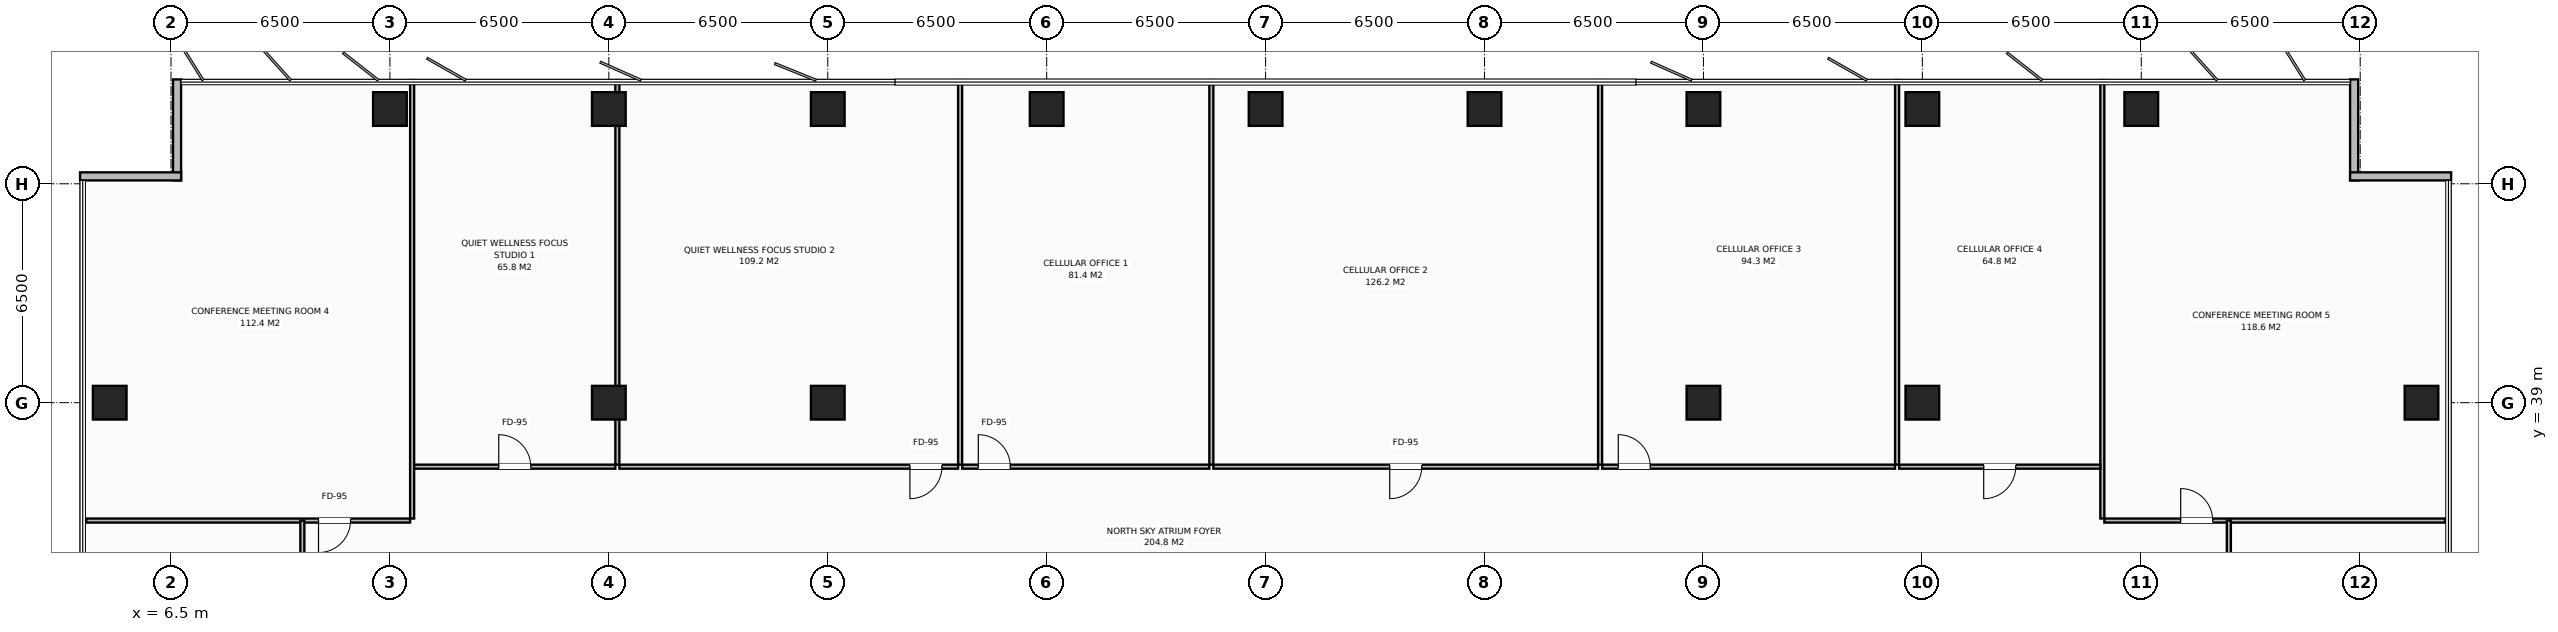
"""IFC4 building model, lengths in metres.
Left out: names, types, materials, properties, quantities, classifications, styles, units other than length and angle.
Written with IfcOpenShell. Run it as: python <this file> out.ifc"""

import sys

from ifc_helpers import new_model, si_unit, direction, frame, frame_2d, origin, origin_2d, place, context, subcontext, project, spatial, rectangle, extrude, element, fill, save


model = new_model("IFC4")
c1 = context("Model", 3, precision=1e-05, world=origin(), true_north=direction((0.0, 1.0)))
c2 = subcontext(c1, "Body", "Model", "MODEL_VIEW")
j1 = project(units=[si_unit("LENGTHUNIT", "METRE"), si_unit("PLANEANGLEUNIT", "RADIAN")], contexts=[c1])
p1 = place(None, origin())
s1 = spatial("IfcSite", under=j1, at=p1, CompositionType="ELEMENT")
p2 = place(p1, origin())
s2 = spatial("IfcBuilding", under=s1, at=p2, CompositionType="ELEMENT")
p3 = place(p2, frame((0.0, 0.0, 174.6)))
s3 = spatial("IfcBuildingStorey", under=s2, at=p3, CompositionType="ELEMENT", Elevation=174.6)
for number, where, z_axis, x_axis in (
    (1, (19.5, 39.0, 0.0), (0.0, 0.0, 1.0), (1.0, 0.0, 0.0)),
    (2, (58.5, 39.0, 0.0), (0.0, 0.0, 1.0), (1.0, 0.0, 0.0)),
    (3, (26.0, 39.0, 0.0), (0.0, 0.0, 1.0), (1.0, 0.0, 0.0)),
    (4, (52.0, 39.0, 0.0), (0.0, 0.0, 1.0), (1.0, 0.0, 0.0)),
    (5, (13.0, 47.72, 0.0), (0.0, 0.0, 1.0), (1.0, 0.0, 0.0)),
    (6, (19.5, 47.72, 0.0), (0.0, 0.0, 1.0), (1.0, 0.0, 0.0)),
    (7, (26.0, 47.72, 0.0), (0.0, 0.0, 1.0), (1.0, 0.0, 0.0)),
    (8, (32.5, 47.72, 0.0), (0.0, 0.0, 1.0), (1.0, 0.0, 0.0)),
    (9, (39.0, 47.72, 0.0), (0.0, 0.0, 1.0), (1.0, 0.0, 0.0)),
    (10, (45.5, 47.72, 0.0), (0.0, 0.0, 1.0), (1.0, 0.0, 0.0)),
    (11, (52.0, 47.72, 0.0), (0.0, 0.0, 1.0), (1.0, 0.0, 0.0)),
    (12, (58.5, 47.72, 0.0), (0.0, 0.0, 1.0), (1.0, 0.0, 0.0)),
    (13, (65.0, 47.72, 0.0), (0.0, 0.0, 1.0), (1.0, 0.0, 0.0)),
    (14, (4.68, 39.0, 0.0), (0.0, 0.0, 1.0), (1.0, 0.0, 0.0)),
    (15, (73.32, 39.0, 0.0), (0.0, 0.0, 1.0), (1.0, 0.0, 0.0)),
):
    element("IfcColumn", number, at=place(p3, frame(where, z_axis=z_axis, x_axis=x_axis)), inside=s3, PredefinedType="COLUMN", context=c2, shape_type="SweptSolid", body=[
        extrude(rectangle(XDim=1.0, YDim=1.0, at=origin_2d()), origin(), (0.0, 0.0, 1.0), 3.8),
    ])
for number, where, z_axis, x_axis in (
    (16, (6.68, 45.6, 0.0), (0.0, 0.0, 1.0), (0.0, 1.0, 0.0)),
    (17, (3.8, 45.72, 0.0), (0.0, 0.0, 1.0), (1.0, 0.0, 0.0)),
    (18, (71.32, 48.6, 0.0), (0.0, 0.0, 1.0), (0.0, -1.0, 0.0)),
    (19, (71.2, 45.72, 0.0), (0.0, 0.0, 1.0), (1.0, 0.0, 0.0)),
):
    element("IfcWall", number, at=place(p3, frame(where, z_axis=z_axis, x_axis=x_axis)), inside=s3, PredefinedType="STANDARD", context=c2, shape_type="SweptSolid", body=[
        extrude(rectangle(XDim=3.0, YDim=0.24, at=frame_2d((1.5, 0.0))), origin(), (0.0, 0.0, 1.0), 3.572),
    ])
p4 = place(p3, frame((13.659, 35.56, 0.0), z_axis=(0.0, 0.0, 1.0), x_axis=(0.0, 1.0, 0.0)))
e20 = element("IfcWall", 20, at=p4, inside=s3, PredefinedType="PARTITIONING", context=c2, shape_type="SweptSolid", body=[
    extrude(rectangle(XDim=13.02, YDim=0.12, at=frame_2d((6.51, 0.0))), origin(), (0.0, 0.0, 1.0), 3.572),
])
p5 = place(p3, frame((3.98, 35.5, 0.0), z_axis=(0.0, 0.0, 1.0), x_axis=(1.0, 0.0, 0.0)))
e21 = element("IfcWall", 21, at=p5, inside=s3, PredefinedType="PARTITIONING", context=c2, shape_type="SweptSolid", body=[
    extrude(rectangle(XDim=9.62, YDim=0.12, at=frame_2d((4.81, 0.0))), origin(), (0.0, 0.0, 1.0), 3.572),
])
p6 = place(p5, frame((6.9, 0.0, 0.0)))
e22 = element("IfcOpeningElement", 22, at=p6, cuts=e21, PredefinedType="OPENING", context=c2, shape_type="SweptSolid", body=[
    extrude(rectangle(XDim=0.95, YDim=2.15, at=frame_2d((0.475, 1.075))), frame((0.0, 0.07, 0.0), z_axis=(0.0, -1.0, 0.0), x_axis=(1.0, 0.0, 0.0)), (0.0, 0.0, 1.0), 0.14),
])
p7 = place(p3, frame((19.753, 37.16, 0.0), z_axis=(0.0, 0.0, 1.0), x_axis=(0.0, 1.0, 0.0)))
e23 = element("IfcWall", 23, at=p7, inside=s3, PredefinedType="PARTITIONING", context=c2, shape_type="SweptSolid", body=[
    extrude(rectangle(XDim=11.42, YDim=0.12, at=frame_2d((5.71, 0.0))), origin(), (0.0, 0.0, 1.0), 3.572),
])
p8 = place(p3, frame((13.719, 37.1, 0.0), z_axis=(0.0, 0.0, 1.0), x_axis=(1.0, 0.0, 0.0)))
e24 = element("IfcWall", 24, at=p8, inside=s3, PredefinedType="PARTITIONING", context=c2, shape_type="SweptSolid", body=[
    extrude(rectangle(XDim=5.974, YDim=0.12, at=frame_2d((2.987, 0.0))), origin(), (0.0, 0.0, 1.0), 3.572),
])
p9 = place(p8, frame((2.512, 0.0, 0.0)))
e25 = element("IfcOpeningElement", 25, at=p9, cuts=e24, PredefinedType="OPENING", context=c2, shape_type="SweptSolid", body=[
    extrude(rectangle(XDim=0.95, YDim=2.15, at=frame_2d((0.475, 1.075))), frame((0.0, 0.07, 0.0), z_axis=(0.0, -1.0, 0.0), x_axis=(1.0, 0.0, 0.0)), (0.0, 0.0, 1.0), 0.14),
])
p10 = place(p3, frame((29.93, 37.16, 0.0), z_axis=(0.0, 0.0, 1.0), x_axis=(0.0, 1.0, 0.0)))
e26 = element("IfcWall", 26, at=p10, inside=s3, PredefinedType="PARTITIONING", context=c2, shape_type="SweptSolid", body=[
    extrude(rectangle(XDim=11.42, YDim=0.12, at=frame_2d((5.71, 0.0))), origin(), (0.0, 0.0, 1.0), 3.572),
])
p11 = place(p3, frame((19.813, 37.1, 0.0), z_axis=(0.0, 0.0, 1.0), x_axis=(1.0, 0.0, 0.0)))
e27 = element("IfcWall", 27, at=p11, inside=s3, PredefinedType="PARTITIONING", context=c2, shape_type="SweptSolid", body=[
    extrude(rectangle(XDim=10.057, YDim=0.12, at=frame_2d((5.028, 0.0))), origin(), (0.0, 0.0, 1.0), 3.572),
])
p12 = place(p11, frame((8.627, 0.0, 0.0)))
e28 = element("IfcOpeningElement", 28, at=p12, cuts=e27, PredefinedType="OPENING", context=c2, shape_type="SweptSolid", body=[
    extrude(rectangle(XDim=0.95, YDim=2.15, at=frame_2d((0.475, 1.075))), frame((0.0, 0.07, 0.0), z_axis=(0.0, -1.0, 0.0), x_axis=(1.0, 0.0, 0.0)), (0.0, 0.0, 1.0), 0.14),
])
p13 = place(p3, frame((37.389, 37.16, 0.0), z_axis=(0.0, 0.0, 1.0), x_axis=(0.0, 1.0, 0.0)))
e29 = element("IfcWall", 29, at=p13, inside=s3, PredefinedType="PARTITIONING", context=c2, shape_type="SweptSolid", body=[
    extrude(rectangle(XDim=11.42, YDim=0.12, at=frame_2d((5.71, 0.0))), origin(), (0.0, 0.0, 1.0), 3.572),
])
p14 = place(p3, frame((29.99, 37.1, 0.0), z_axis=(0.0, 0.0, 1.0), x_axis=(1.0, 0.0, 0.0)))
e30 = element("IfcWall", 30, at=p14, inside=s3, PredefinedType="PARTITIONING", context=c2, shape_type="SweptSolid", body=[
    extrude(rectangle(XDim=7.339, YDim=0.12, at=frame_2d((3.67, 0.0))), origin(), (0.0, 0.0, 1.0), 3.572),
])
p15 = place(p14, frame((0.48, 0.0, 0.0)))
e31 = element("IfcOpeningElement", 31, at=p15, cuts=e30, PredefinedType="OPENING", context=c2, shape_type="SweptSolid", body=[
    extrude(rectangle(XDim=0.95, YDim=2.15, at=frame_2d((0.475, 1.075))), frame((0.0, 0.07, 0.0), z_axis=(0.0, -1.0, 0.0), x_axis=(1.0, 0.0, 0.0)), (0.0, 0.0, 1.0), 0.14),
])
p16 = place(p3, frame((48.932, 37.16, 0.0), z_axis=(0.0, 0.0, 1.0), x_axis=(0.0, 1.0, 0.0)))
e32 = element("IfcWall", 32, at=p16, inside=s3, PredefinedType="PARTITIONING", context=c2, shape_type="SweptSolid", body=[
    extrude(rectangle(XDim=11.42, YDim=0.12, at=frame_2d((5.71, 0.0))), origin(), (0.0, 0.0, 1.0), 3.572),
])
p17 = place(p3, frame((37.449, 37.1, 0.0), z_axis=(0.0, 0.0, 1.0), x_axis=(1.0, 0.0, 0.0)))
e33 = element("IfcWall", 33, at=p17, inside=s3, PredefinedType="PARTITIONING", context=c2, shape_type="SweptSolid", body=[
    extrude(rectangle(XDim=11.422, YDim=0.12, at=frame_2d((5.711, 0.0))), origin(), (0.0, 0.0, 1.0), 3.572),
])
p18 = place(p17, frame((5.236, 0.0, 0.0)))
e34 = element("IfcOpeningElement", 34, at=p18, cuts=e33, PredefinedType="OPENING", context=c2, shape_type="SweptSolid", body=[
    extrude(rectangle(XDim=0.95, YDim=2.15, at=frame_2d((0.475, 1.075))), frame((0.0, 0.07, 0.0), z_axis=(0.0, -1.0, 0.0), x_axis=(1.0, 0.0, 0.0)), (0.0, 0.0, 1.0), 0.14),
])
p19 = place(p3, frame((57.75, 37.16, 0.0), z_axis=(0.0, 0.0, 1.0), x_axis=(0.0, 1.0, 0.0)))
e35 = element("IfcWall", 35, at=p19, inside=s3, PredefinedType="PARTITIONING", context=c2, shape_type="SweptSolid", body=[
    extrude(rectangle(XDim=11.42, YDim=0.12, at=frame_2d((5.71, 0.0))), origin(), (0.0, 0.0, 1.0), 3.572),
])
p20 = place(p3, frame((48.992, 37.1, 0.0), z_axis=(0.0, 0.0, 1.0), x_axis=(1.0, 0.0, 0.0)))
e36 = element("IfcWall", 36, at=p20, inside=s3, PredefinedType="PARTITIONING", context=c2, shape_type="SweptSolid", body=[
    extrude(rectangle(XDim=8.698, YDim=0.12, at=frame_2d((4.349, 0.0))), origin(), (0.0, 0.0, 1.0), 3.572),
])
p21 = place(p20, frame((0.48, 0.0, 0.0)))
e37 = element("IfcOpeningElement", 37, at=p21, cuts=e36, PredefinedType="OPENING", context=c2, shape_type="SweptSolid", body=[
    extrude(rectangle(XDim=0.95, YDim=2.15, at=frame_2d((0.475, 1.075))), frame((0.0, 0.07, 0.0), z_axis=(0.0, -1.0, 0.0), x_axis=(1.0, 0.0, 0.0)), (0.0, 0.0, 1.0), 0.14),
])
p22 = place(p3, frame((63.843, 35.56, 0.0), z_axis=(0.0, 0.0, 1.0), x_axis=(0.0, 1.0, 0.0)))
e38 = element("IfcWall", 38, at=p22, inside=s3, PredefinedType="PARTITIONING", context=c2, shape_type="SweptSolid", body=[
    extrude(rectangle(XDim=13.02, YDim=0.12, at=frame_2d((6.51, 0.0))), origin(), (0.0, 0.0, 1.0), 3.572),
])
p23 = place(p3, frame((57.81, 37.1, 0.0), z_axis=(0.0, 0.0, 1.0), x_axis=(1.0, 0.0, 0.0)))
e39 = element("IfcWall", 39, at=p23, inside=s3, PredefinedType="PARTITIONING", context=c2, shape_type="SweptSolid", body=[
    extrude(rectangle(XDim=5.973, YDim=0.12, at=frame_2d((2.987, 0.0))), origin(), (0.0, 0.0, 1.0), 3.572),
])
p24 = place(p23, frame((2.512, 0.0, 0.0)))
e40 = element("IfcOpeningElement", 40, at=p24, cuts=e39, PredefinedType="OPENING", context=c2, shape_type="SweptSolid", body=[
    extrude(rectangle(XDim=0.95, YDim=2.15, at=frame_2d((0.475, 1.075))), frame((0.0, 0.07, 0.0), z_axis=(0.0, -1.0, 0.0), x_axis=(1.0, 0.0, 0.0)), (0.0, 0.0, 1.0), 0.14),
])
p25 = place(p3, frame((63.903, 35.5, 0.0), z_axis=(0.0, 0.0, 1.0), x_axis=(1.0, 0.0, 0.0)))
e41 = element("IfcWall", 41, at=p25, inside=s3, PredefinedType="PARTITIONING", context=c2, shape_type="SweptSolid", body=[
    extrude(rectangle(XDim=10.117, YDim=0.12, at=frame_2d((5.058, 0.0))), origin(), (0.0, 0.0, 1.0), 3.572),
])
p26 = place(p25, frame((2.267, 0.0, 0.0)))
e42 = element("IfcOpeningElement", 42, at=p26, cuts=e41, PredefinedType="OPENING", context=c2, shape_type="SweptSolid", body=[
    extrude(rectangle(XDim=0.95, YDim=2.15, at=frame_2d((0.475, 1.075))), frame((0.0, 0.07, 0.0), z_axis=(0.0, -1.0, 0.0), x_axis=(1.0, 0.0, 0.0)), (0.0, 0.0, 1.0), 0.14),
])
p27 = place(p3, frame((10.4, 27.05, 0.0), z_axis=(0.0, 0.0, 1.0), x_axis=(0.0, 1.0, 0.0)))
e43 = element("IfcWall", 43, at=p27, inside=s3, PredefinedType="PARTITIONING", context=c2, shape_type="SweptSolid", body=[
    extrude(rectangle(XDim=8.45, YDim=0.12, at=frame_2d((4.225, 0.0))), origin(), (0.0, 0.0, 1.0), 3.572),
])
p28 = place(p27, frame((2.7, 0.0, 0.0)))
e44 = element("IfcOpeningElement", 44, at=p28, cuts=e43, PredefinedType="OPENING", context=c2, shape_type="SweptSolid", body=[
    extrude(rectangle(XDim=0.95, YDim=2.15, at=frame_2d((0.475, 1.075))), frame((0.0, 0.07, 0.0), z_axis=(0.0, -1.0, 0.0), x_axis=(1.0, 0.0, 0.0)), (0.0, 0.0, 1.0), 0.14),
])
p29 = place(p3, frame((67.6, 16.5, 0.0), z_axis=(0.0, 0.0, 1.0), x_axis=(0.0, 1.0, 0.0)))
e45 = element("IfcWall", 45, at=p29, inside=s3, PredefinedType="PARTITIONING", context=c2, shape_type="SweptSolid", body=[
    extrude(rectangle(XDim=19.0, YDim=0.12, at=frame_2d((9.5, 0.0))), origin(), (0.0, 0.0, 1.0), 3.572),
])
p30 = place(p29, frame((9.025, 0.0, 0.0)))
e46 = element("IfcOpeningElement", 46, at=p30, cuts=e45, PredefinedType="OPENING", context=c2, shape_type="SweptSolid", body=[
    extrude(rectangle(XDim=0.95, YDim=2.15, at=frame_2d((0.475, 1.075))), frame((0.0, 0.07, 0.0), z_axis=(0.0, -1.0, 0.0), x_axis=(1.0, 0.0, 0.0)), (0.0, 0.0, 1.0), 0.14),
])
p31 = place(p6, origin())
e47 = element("IfcDoor", 47, at=p31, inside=s3, OperationType="SINGLE_SWING_RIGHT", PredefinedType="DOOR", context=c2, shape_type="SweptSolid", body=[
    extrude(rectangle(XDim=0.95, YDim=2.15, at=frame_2d((0.475, 1.075))), frame((0.0, 0.025, 0.0), z_axis=(0.0, -1.0, 0.0), x_axis=(1.0, 0.0, 0.0)), (0.0, 0.0, 1.0), 0.05),
])
fill(e22, e47)
p32 = place(p9, origin())
e48 = element("IfcDoor", 48, at=p32, inside=s3, OperationType="SINGLE_SWING_LEFT", PredefinedType="DOOR", context=c2, shape_type="SweptSolid", body=[
    extrude(rectangle(XDim=0.95, YDim=2.15, at=frame_2d((0.475, 1.075))), frame((0.0, 0.025, 0.0), z_axis=(0.0, -1.0, 0.0), x_axis=(1.0, 0.0, 0.0)), (0.0, 0.0, 1.0), 0.05),
])
fill(e25, e48)
p33 = place(p12, origin())
e49 = element("IfcDoor", 49, at=p33, inside=s3, OperationType="SINGLE_SWING_RIGHT", PredefinedType="DOOR", context=c2, shape_type="SweptSolid", body=[
    extrude(rectangle(XDim=0.95, YDim=2.15, at=frame_2d((0.475, 1.075))), frame((0.0, 0.025, 0.0), z_axis=(0.0, -1.0, 0.0), x_axis=(1.0, 0.0, 0.0)), (0.0, 0.0, 1.0), 0.05),
])
fill(e28, e49)
p34 = place(p15, origin())
e50 = element("IfcDoor", 50, at=p34, inside=s3, OperationType="SINGLE_SWING_LEFT", PredefinedType="DOOR", context=c2, shape_type="SweptSolid", body=[
    extrude(rectangle(XDim=0.95, YDim=2.15, at=frame_2d((0.475, 1.075))), frame((0.0, 0.025, 0.0), z_axis=(0.0, -1.0, 0.0), x_axis=(1.0, 0.0, 0.0)), (0.0, 0.0, 1.0), 0.05),
])
fill(e31, e50)
p35 = place(p18, origin())
e51 = element("IfcDoor", 51, at=p35, inside=s3, OperationType="SINGLE_SWING_RIGHT", PredefinedType="DOOR", context=c2, shape_type="SweptSolid", body=[
    extrude(rectangle(XDim=0.95, YDim=2.15, at=frame_2d((0.475, 1.075))), frame((0.0, 0.025, 0.0), z_axis=(0.0, -1.0, 0.0), x_axis=(1.0, 0.0, 0.0)), (0.0, 0.0, 1.0), 0.05),
])
fill(e34, e51)
p36 = place(p21, origin())
e52 = element("IfcDoor", 52, at=p36, inside=s3, OperationType="SINGLE_SWING_LEFT", PredefinedType="DOOR", context=c2, shape_type="SweptSolid", body=[
    extrude(rectangle(XDim=0.95, YDim=2.15, at=frame_2d((0.475, 1.075))), frame((0.0, 0.025, 0.0), z_axis=(0.0, -1.0, 0.0), x_axis=(1.0, 0.0, 0.0)), (0.0, 0.0, 1.0), 0.05),
])
fill(e37, e52)
p37 = place(p24, origin())
e53 = element("IfcDoor", 53, at=p37, inside=s3, OperationType="SINGLE_SWING_RIGHT", PredefinedType="DOOR", context=c2, shape_type="SweptSolid", body=[
    extrude(rectangle(XDim=0.95, YDim=2.15, at=frame_2d((0.475, 1.075))), frame((0.0, 0.025, 0.0), z_axis=(0.0, -1.0, 0.0), x_axis=(1.0, 0.0, 0.0)), (0.0, 0.0, 1.0), 0.05),
])
fill(e40, e53)
p38 = place(p26, origin())
e54 = element("IfcDoor", 54, at=p38, inside=s3, OperationType="SINGLE_SWING_LEFT", PredefinedType="DOOR", context=c2, shape_type="SweptSolid", body=[
    extrude(rectangle(XDim=0.95, YDim=2.15, at=frame_2d((0.475, 1.075))), frame((0.0, 0.025, 0.0), z_axis=(0.0, -1.0, 0.0), x_axis=(1.0, 0.0, 0.0)), (0.0, 0.0, 1.0), 0.05),
])
fill(e42, e54)
save(model, sys.argv[1])
